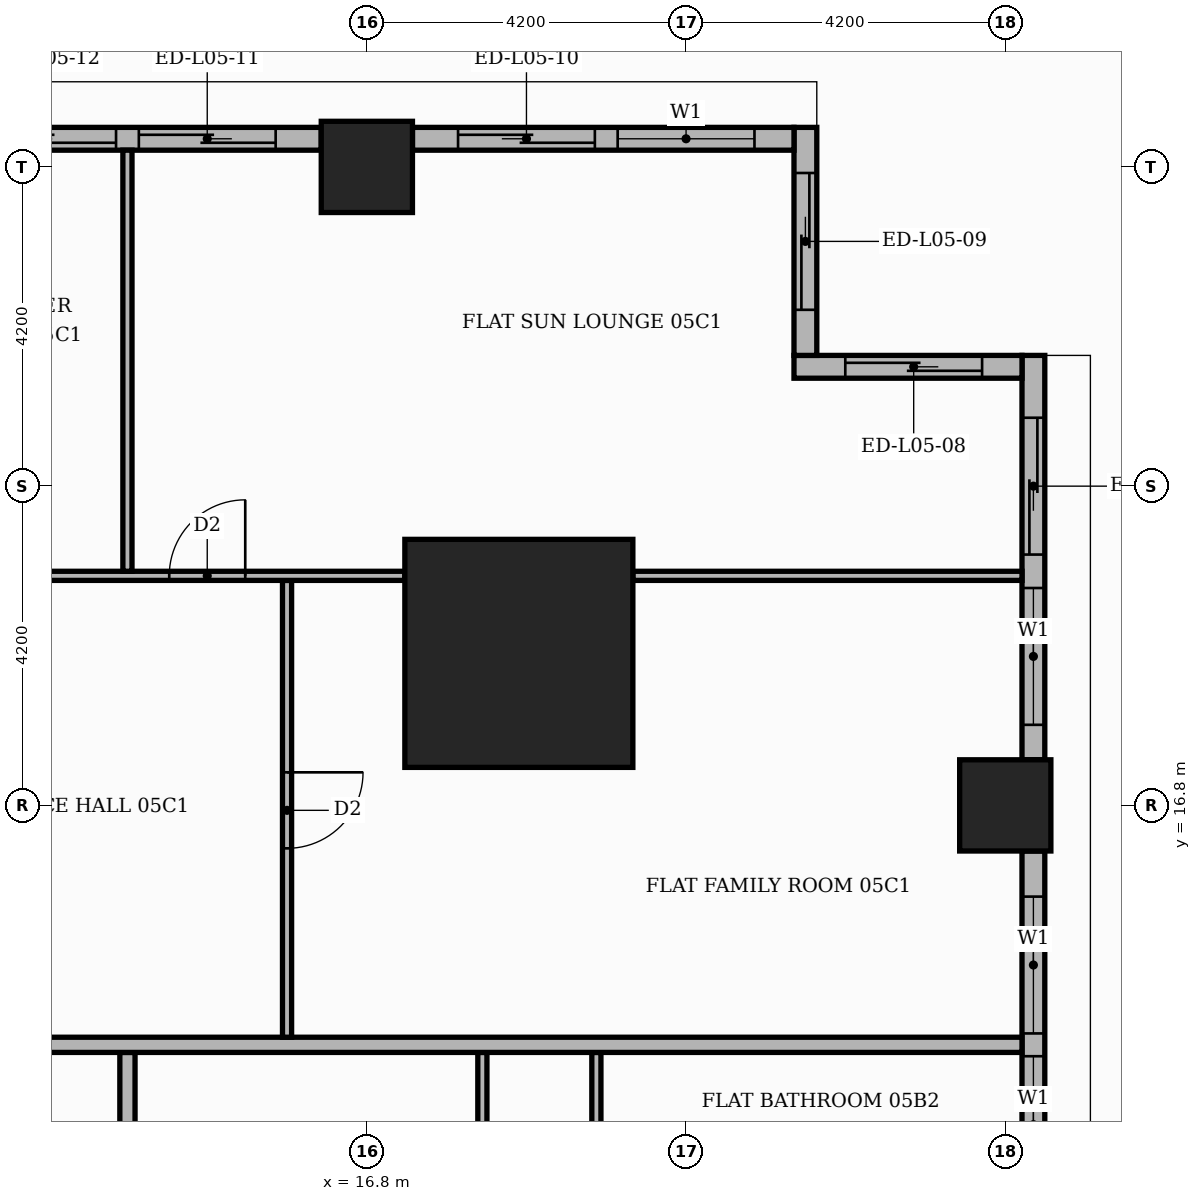
"""IFC4 building model, lengths in metres.
Left out: names, types, materials, properties, quantities, classifications, styles, units other than length and angle.
Written with IfcOpenShell. Run it as: python <this file> out.ifc"""

import sys

from ifc_helpers import new_model, si_unit, direction, frame, frame_2d, origin, origin_2d, place, context, subcontext, project, spatial, rectangle, extrude, element, fill, save


model = new_model("IFC4")
c1 = context("Model", 3, precision=1e-05, world=origin(), true_north=direction((0.0, 1.0)))
c2 = subcontext(c1, "Body", "Model", "MODEL_VIEW")
j1 = project(units=[si_unit("LENGTHUNIT", "METRE"), si_unit("PLANEANGLEUNIT", "RADIAN")], contexts=[c1])
p1 = place(None, origin())
s1 = spatial("IfcSite", under=j1, at=p1, CompositionType="ELEMENT")
p2 = place(p1, origin())
s2 = spatial("IfcBuilding", under=s1, at=p2, CompositionType="ELEMENT")
p3 = place(p2, frame((0.0, 0.0, 27.0)))
s3 = spatial("IfcBuildingStorey", under=s2, at=p3, CompositionType="ELEMENT", Elevation=27.0)
p4 = place(p3, frame((18.8, 18.8, 0.0), z_axis=(0.0, 0.0, 1.0), x_axis=(1.0, 0.0, 0.0)))
e1 = element("IfcColumn", 1, at=p4, inside=s3, PredefinedType="COLUMN", context=c2, shape_type="SweptSolid", body=[
    extrude(rectangle(XDim=3.0, YDim=3.0, at=origin_2d()), origin(), (0.0, 0.0, 1.0), 3.9),
])
for number, where, z_axis, x_axis in (
    (2, (25.2, 16.8, 0.0), (0.0, 0.0, 1.0), (1.0, 0.0, 0.0)),
    (3, (16.8, 25.2, 0.0), (0.0, 0.0, 1.0), (1.0, 0.0, 0.0)),
):
    element("IfcColumn", number, at=place(p3, frame(where, z_axis=z_axis, x_axis=x_axis)), inside=s3, PredefinedType="COLUMN", context=c2, shape_type="SweptSolid", body=[
        extrude(rectangle(XDim=1.2, YDim=1.2, at=origin_2d()), origin(), (0.0, 0.0, 1.0), 3.9),
    ])
p5 = place(p3, frame((25.57, 9.0, 0.0), z_axis=(0.0, 0.0, 1.0), x_axis=(0.0, 1.0, 0.0)))
e4 = element("IfcWall", 4, at=p5, inside=s3, PredefinedType="STANDARD", context=c2, shape_type="SweptSolid", body=[
    extrude(rectangle(XDim=7.2, YDim=0.3, at=frame_2d((3.6, 0.0))), origin(), (0.0, 0.0, 1.0), 3.48),
])
p6 = place(p5, frame((0.6, 0.0, 0.9)))
e5 = element("IfcOpeningElement", 5, at=p6, cuts=e4, PredefinedType="OPENING", context=c2, shape_type="SweptSolid", body=[
    extrude(rectangle(XDim=1.8, YDim=2.1, at=frame_2d((0.9, 1.05))), frame((0.0, 0.16, 0.0), z_axis=(0.0, -1.0, 0.0), x_axis=(1.0, 0.0, 0.0)), (0.0, 0.0, 1.0), 0.32),
])
p7 = place(p5, frame((2.7, 0.0, 0.9)))
e6 = element("IfcOpeningElement", 6, at=p7, cuts=e4, PredefinedType="OPENING", context=c2, shape_type="SweptSolid", body=[
    extrude(rectangle(XDim=1.8, YDim=2.1, at=frame_2d((0.9, 1.05))), frame((0.0, 0.16, 0.0), z_axis=(0.0, -1.0, 0.0), x_axis=(1.0, 0.0, 0.0)), (0.0, 0.0, 1.0), 0.32),
])
p8 = place(p5, frame((4.8, 0.0, 0.9)))
e7 = element("IfcOpeningElement", 7, at=p8, cuts=e4, PredefinedType="OPENING", context=c2, shape_type="SweptSolid", body=[
    extrude(rectangle(XDim=1.8, YDim=2.1, at=frame_2d((0.9, 1.05))), frame((0.0, 0.16, 0.0), z_axis=(0.0, -1.0, 0.0), x_axis=(1.0, 0.0, 0.0)), (0.0, 0.0, 1.0), 0.32),
])
p9 = place(p3, frame((25.57, 17.4, 0.0), z_axis=(0.0, 0.0, 1.0), x_axis=(0.0, 1.0, 0.0)))
e8 = element("IfcWall", 8, at=p9, inside=s3, PredefinedType="STANDARD", context=c2, shape_type="SweptSolid", body=[
    extrude(rectangle(XDim=5.32, YDim=0.3, at=frame_2d((2.66, 0.0))), origin(), (0.0, 0.0, 1.0), 3.48),
])
p10 = place(p9, frame((2.7, 0.0, 0.0)))
e9 = element("IfcOpeningElement", 9, at=p10, cuts=e8, PredefinedType="OPENING", context=c2, shape_type="SweptSolid", body=[
    extrude(rectangle(XDim=1.8, YDim=2.4, at=frame_2d((0.9, 1.2))), frame((0.0, 0.16, 0.0), z_axis=(0.0, -1.0, 0.0), x_axis=(1.0, 0.0, 0.0)), (0.0, 0.0, 1.0), 0.32),
])
p11 = place(p9, frame((0.46, 0.0, 0.9)))
e10 = element("IfcOpeningElement", 10, at=p11, cuts=e8, PredefinedType="OPENING", context=c2, shape_type="SweptSolid", body=[
    extrude(rectangle(XDim=1.8, YDim=2.1, at=frame_2d((0.9, 1.05))), frame((0.0, 0.16, 0.0), z_axis=(0.0, -1.0, 0.0), x_axis=(1.0, 0.0, 0.0)), (0.0, 0.0, 1.0), 0.32),
])
p12 = place(p3, frame((25.42, 22.57, 0.0), z_axis=(0.0, 0.0, 1.0), x_axis=(-1.0, 0.0, 0.0)))
e11 = element("IfcWall", 11, at=p12, inside=s3, PredefinedType="STANDARD", context=c2, shape_type="SweptSolid", body=[
    extrude(rectangle(XDim=3.0, YDim=0.3, at=frame_2d((1.5, 0.0))), origin(), (0.0, 0.0, 1.0), 3.48),
])
p13 = place(p12, frame((0.525, 0.0, 0.0)))
e12 = element("IfcOpeningElement", 12, at=p13, cuts=e11, PredefinedType="OPENING", context=c2, shape_type="SweptSolid", body=[
    extrude(rectangle(XDim=1.8, YDim=2.4, at=frame_2d((0.9, 1.2))), frame((0.0, 0.16, 0.0), z_axis=(0.0, -1.0, 0.0), x_axis=(1.0, 0.0, 0.0)), (0.0, 0.0, 1.0), 0.32),
])
p14 = place(p3, frame((22.57, 22.72, 0.0), z_axis=(0.0, 0.0, 1.0), x_axis=(0.0, 1.0, 0.0)))
e13 = element("IfcWall", 13, at=p14, inside=s3, PredefinedType="STANDARD", context=c2, shape_type="SweptSolid", body=[
    extrude(rectangle(XDim=3.0, YDim=0.3, at=frame_2d((1.5, 0.0))), origin(), (0.0, 0.0, 1.0), 3.48),
])
p15 = place(p14, frame((0.6, 0.0, 0.0)))
e14 = element("IfcOpeningElement", 14, at=p15, cuts=e13, PredefinedType="OPENING", context=c2, shape_type="SweptSolid", body=[
    extrude(rectangle(XDim=1.8, YDim=2.4, at=frame_2d((0.9, 1.2))), frame((0.0, 0.16, 0.0), z_axis=(0.0, -1.0, 0.0), x_axis=(1.0, 0.0, 0.0)), (0.0, 0.0, 1.0), 0.32),
])
p16 = place(p3, frame((22.42, 25.57, 0.0), z_axis=(0.0, 0.0, 1.0), x_axis=(-1.0, 0.0, 0.0)))
e15 = element("IfcWall", 15, at=p16, inside=s3, PredefinedType="STANDARD", context=c2, shape_type="SweptSolid", body=[
    extrude(rectangle(XDim=5.02, YDim=0.3, at=frame_2d((2.51, 0.0))), origin(), (0.0, 0.0, 1.0), 3.48),
])
p17 = place(p16, frame((0.52, 0.0, 0.9)))
e16 = element("IfcOpeningElement", 16, at=p17, cuts=e15, PredefinedType="OPENING", context=c2, shape_type="SweptSolid", body=[
    extrude(rectangle(XDim=1.8, YDim=2.1, at=frame_2d((0.9, 1.05))), frame((0.0, 0.16, 0.0), z_axis=(0.0, -1.0, 0.0), x_axis=(1.0, 0.0, 0.0)), (0.0, 0.0, 1.0), 0.32),
])
p18 = place(p16, frame((2.62, 0.0, 0.0)))
e17 = element("IfcOpeningElement", 17, at=p18, cuts=e15, PredefinedType="OPENING", context=c2, shape_type="SweptSolid", body=[
    extrude(rectangle(XDim=1.8, YDim=2.4, at=frame_2d((0.9, 1.2))), frame((0.0, 0.16, 0.0), z_axis=(0.0, -1.0, 0.0), x_axis=(1.0, 0.0, 0.0)), (0.0, 0.0, 1.0), 0.32),
])
p19 = place(p3, frame((16.2, 25.57, 0.0), z_axis=(0.0, 0.0, 1.0), x_axis=(-1.0, 0.0, 0.0)))
e18 = element("IfcWall", 18, at=p19, inside=s3, PredefinedType="STANDARD", context=c2, shape_type="SweptSolid", body=[
    extrude(rectangle(XDim=7.2, YDim=0.3, at=frame_2d((3.6, 0.0))), origin(), (0.0, 0.0, 1.0), 3.48),
])
p20 = place(p19, frame((0.6, 0.0, 0.0)))
e19 = element("IfcOpeningElement", 19, at=p20, cuts=e18, PredefinedType="OPENING", context=c2, shape_type="SweptSolid", body=[
    extrude(rectangle(XDim=1.8, YDim=2.4, at=frame_2d((0.9, 1.2))), frame((0.0, 0.16, 0.0), z_axis=(0.0, -1.0, 0.0), x_axis=(1.0, 0.0, 0.0)), (0.0, 0.0, 1.0), 0.32),
])
p21 = place(p19, frame((2.7, 0.0, 0.0)))
e20 = element("IfcOpeningElement", 20, at=p21, cuts=e18, PredefinedType="OPENING", context=c2, shape_type="SweptSolid", body=[
    extrude(rectangle(XDim=1.8, YDim=2.4, at=frame_2d((0.9, 1.2))), frame((0.0, 0.16, 0.0), z_axis=(0.0, -1.0, 0.0), x_axis=(1.0, 0.0, 0.0)), (0.0, 0.0, 1.0), 0.32),
])
p22 = place(p19, frame((4.8, 0.0, 0.9)))
e21 = element("IfcOpeningElement", 21, at=p22, cuts=e18, PredefinedType="OPENING", context=c2, shape_type="SweptSolid", body=[
    extrude(rectangle(XDim=1.8, YDim=2.1, at=frame_2d((0.9, 1.05))), frame((0.0, 0.16, 0.0), z_axis=(0.0, -1.0, 0.0), x_axis=(1.0, 0.0, 0.0)), (0.0, 0.0, 1.0), 0.32),
])
p23 = place(p3, frame((13.65, -5.15, 0.0), z_axis=(0.0, 0.0, 1.0), x_axis=(0.0, 1.0, 0.0)))
e22 = element("IfcWall", 22, at=p23, inside=s3, PredefinedType="PARTITIONING", context=c2, shape_type="SweptSolid", body=[
    extrude(rectangle(XDim=18.7, YDim=0.2, at=frame_2d((9.35, 0.0))), origin(), (0.0, 0.0, 1.0), 3.48),
])
p24 = place(p23, frame((3.55, 0.0, 0.0)))
e23 = element("IfcOpeningElement", 23, at=p24, cuts=e22, PredefinedType="OPENING", context=c2, shape_type="SweptSolid", body=[
    extrude(rectangle(XDim=1.1, YDim=2.4, at=frame_2d((0.55, 1.2))), frame((0.0, 0.11, 0.0), z_axis=(0.0, -1.0, 0.0), x_axis=(1.0, 0.0, 0.0)), (0.0, 0.0, 1.0), 0.22),
])
p25 = place(p3, frame((18.32, 9.81, 0.0), z_axis=(0.0, 0.0, 1.0), x_axis=(0.0, 1.0, 0.0)))
e24 = element("IfcWall", 24, at=p25, inside=s3, PredefinedType="PARTITIONING", context=c2, shape_type="SweptSolid", body=[
    extrude(rectangle(XDim=3.74, YDim=0.12, at=frame_2d((1.87, 0.0))), origin(), (0.0, 0.0, 1.0), 3.48),
])
p26 = place(p25, frame((1.44, 0.0, 0.0)))
e25 = element("IfcOpeningElement", 25, at=p26, cuts=e24, PredefinedType="OPENING", context=c2, shape_type="SweptSolid", body=[
    extrude(rectangle(XDim=0.9, YDim=2.1, at=frame_2d((0.45, 1.05))), frame((0.0, 0.07, 0.0), z_axis=(0.0, -1.0, 0.0), x_axis=(1.0, 0.0, 0.0)), (0.0, 0.0, 1.0), 0.14),
])
p27 = place(p3, frame((19.82, 11.61, 0.0), z_axis=(0.0, 0.0, 1.0), x_axis=(0.0, 1.0, 0.0)))
e26 = element("IfcWall", 26, at=p27, inside=s3, PredefinedType="PARTITIONING", context=c2, shape_type="SweptSolid", body=[
    extrude(rectangle(XDim=1.94, YDim=0.12, at=frame_2d((0.97, 0.0))), origin(), (0.0, 0.0, 1.0), 3.48),
])
p28 = place(p3, frame((-13.65, 13.65, 0.0), z_axis=(0.0, 0.0, 1.0), x_axis=(1.0, 0.0, 0.0)))
e27 = element("IfcWall", 27, at=p28, inside=s3, PredefinedType="PARTITIONING", context=c2, shape_type="SweptSolid", body=[
    extrude(rectangle(XDim=39.07, YDim=0.2, at=frame_2d((19.535, 0.0))), origin(), (0.0, 0.0, 1.0), 3.48),
])
p29 = place(p28, frame((24.65, 0.0, 0.0)))
e28 = element("IfcOpeningElement", 28, at=p29, cuts=e27, PredefinedType="OPENING", context=c2, shape_type="SweptSolid", body=[
    extrude(rectangle(XDim=1.1, YDim=2.4, at=frame_2d((0.55, 1.2))), frame((0.0, 0.11, 0.0), z_axis=(0.0, -1.0, 0.0), x_axis=(1.0, 0.0, 0.0)), (0.0, 0.0, 1.0), 0.22),
])
p30 = place(p28, frame((14.15, 0.0, 0.0)))
e29 = element("IfcOpeningElement", 29, at=p30, cuts=e27, PredefinedType="OPENING", context=c2, shape_type="SweptSolid", body=[
    extrude(rectangle(XDim=1.1, YDim=2.4, at=frame_2d((0.55, 1.2))), frame((0.0, 0.11, 0.0), z_axis=(0.0, -1.0, 0.0), x_axis=(1.0, 0.0, 0.0)), (0.0, 0.0, 1.0), 0.22),
])
p31 = place(p3, frame((15.75, 13.75, 0.0), z_axis=(0.0, 0.0, 1.0), x_axis=(0.0, 1.0, 0.0)))
e30 = element("IfcWall", 30, at=p31, inside=s3, PredefinedType="PARTITIONING", context=c2, shape_type="SweptSolid", body=[
    extrude(rectangle(XDim=6.01, YDim=0.12, at=frame_2d((3.005, 0.0))), origin(), (0.0, 0.0, 1.0), 3.48),
])
p32 = place(p31, frame((2.485, 0.0, 0.0)))
e31 = element("IfcOpeningElement", 31, at=p32, cuts=e30, PredefinedType="OPENING", context=c2, shape_type="SweptSolid", body=[
    extrude(rectangle(XDim=1.0, YDim=2.1, at=frame_2d((0.5, 1.05))), frame((0.0, 0.07, 0.0), z_axis=(0.0, -1.0, 0.0), x_axis=(1.0, 0.0, 0.0)), (0.0, 0.0, 1.0), 0.14),
])
p33 = place(p3, frame((5.35, 19.82, 0.0), z_axis=(0.0, 0.0, 1.0), x_axis=(1.0, 0.0, 0.0)))
e32 = element("IfcWall", 32, at=p33, inside=s3, PredefinedType="PARTITIONING", context=c2, shape_type="SweptSolid", body=[
    extrude(rectangle(XDim=11.95, YDim=0.12, at=frame_2d((5.975, 0.0))), origin(), (0.0, 0.0, 1.0), 3.48),
])
p34 = place(p33, frame((8.85, 0.0, 0.0)))
e33 = element("IfcOpeningElement", 33, at=p34, cuts=e32, PredefinedType="OPENING", context=c2, shape_type="SweptSolid", body=[
    extrude(rectangle(XDim=1.0, YDim=2.1, at=frame_2d((0.5, 1.05))), frame((0.0, 0.07, 0.0), z_axis=(0.0, -1.0, 0.0), x_axis=(1.0, 0.0, 0.0)), (0.0, 0.0, 1.0), 0.14),
])
p35 = place(p33, frame((5.75, 0.0, 0.0)))
e34 = element("IfcOpeningElement", 34, at=p35, cuts=e32, PredefinedType="OPENING", context=c2, shape_type="SweptSolid", body=[
    extrude(rectangle(XDim=0.9, YDim=2.1, at=frame_2d((0.45, 1.05))), frame((0.0, 0.07, 0.0), z_axis=(0.0, -1.0, 0.0), x_axis=(1.0, 0.0, 0.0)), (0.0, 0.0, 1.0), 0.14),
])
p36 = place(p3, frame((20.3, 19.82, 0.0), z_axis=(0.0, 0.0, 1.0), x_axis=(1.0, 0.0, 0.0)))
e35 = element("IfcWall", 35, at=p36, inside=s3, PredefinedType="PARTITIONING", context=c2, shape_type="SweptSolid", body=[
    extrude(rectangle(XDim=5.12, YDim=0.12, at=frame_2d((2.56, 0.0))), origin(), (0.0, 0.0, 1.0), 3.48),
])
p37 = place(p3, frame((13.65, 19.88, 0.0), z_axis=(0.0, 0.0, 1.0), x_axis=(0.0, 1.0, 0.0)))
e36 = element("IfcWall", 36, at=p37, inside=s3, PredefinedType="PARTITIONING", context=c2, shape_type="SweptSolid", body=[
    extrude(rectangle(XDim=5.54, YDim=0.12, at=frame_2d((2.77, 0.0))), origin(), (0.0, 0.0, 1.0), 3.48),
])
p38 = place(p7, origin())
e37 = element("IfcWindow", 37, at=p38, inside=s3, PartitioningType="SINGLE_PANEL", PredefinedType="WINDOW", context=c2, shape_type="SweptSolid", body=[
    extrude(rectangle(XDim=1.8, YDim=2.1, at=frame_2d((0.9, 1.05))), frame((0.0, 0.03, 0.0), z_axis=(0.0, -1.0, 0.0), x_axis=(1.0, 0.0, 0.0)), (0.0, 0.0, 1.0), 0.06),
])
fill(e6, e37)
p39 = place(p8, origin())
e38 = element("IfcWindow", 38, at=p39, inside=s3, PartitioningType="SINGLE_PANEL", PredefinedType="WINDOW", context=c2, shape_type="SweptSolid", body=[
    extrude(rectangle(XDim=1.8, YDim=2.1, at=frame_2d((0.9, 1.05))), frame((0.0, 0.03, 0.0), z_axis=(0.0, -1.0, 0.0), x_axis=(1.0, 0.0, 0.0)), (0.0, 0.0, 1.0), 0.06),
])
fill(e7, e38)
p40 = place(p10, origin())
e39 = element("IfcDoor", 39, at=p40, inside=s3, OperationType="SLIDING_TO_LEFT", PredefinedType="DOOR", context=c2, shape_type="SweptSolid", body=[
    extrude(rectangle(XDim=1.8, YDim=2.4, at=frame_2d((0.9, 1.2))), frame((0.0, 0.025, 0.0), z_axis=(0.0, -1.0, 0.0), x_axis=(1.0, 0.0, 0.0)), (0.0, 0.0, 1.0), 0.05),
])
fill(e9, e39)
p41 = place(p11, origin())
e40 = element("IfcWindow", 40, at=p41, inside=s3, PartitioningType="SINGLE_PANEL", PredefinedType="WINDOW", context=c2, shape_type="SweptSolid", body=[
    extrude(rectangle(XDim=1.8, YDim=2.1, at=frame_2d((0.9, 1.05))), frame((0.0, 0.03, 0.0), z_axis=(0.0, -1.0, 0.0), x_axis=(1.0, 0.0, 0.0)), (0.0, 0.0, 1.0), 0.06),
])
fill(e10, e40)
p42 = place(p13, origin())
e41 = element("IfcDoor", 41, at=p42, inside=s3, OperationType="SLIDING_TO_LEFT", PredefinedType="DOOR", context=c2, shape_type="SweptSolid", body=[
    extrude(rectangle(XDim=1.8, YDim=2.4, at=frame_2d((0.9, 1.2))), frame((0.0, 0.025, 0.0), z_axis=(0.0, -1.0, 0.0), x_axis=(1.0, 0.0, 0.0)), (0.0, 0.0, 1.0), 0.05),
])
fill(e12, e41)
p43 = place(p15, origin())
e42 = element("IfcDoor", 42, at=p43, inside=s3, OperationType="SLIDING_TO_RIGHT", PredefinedType="DOOR", context=c2, shape_type="SweptSolid", body=[
    extrude(rectangle(XDim=1.8, YDim=2.4, at=frame_2d((0.9, 1.2))), frame((0.0, 0.025, 0.0), z_axis=(0.0, -1.0, 0.0), x_axis=(1.0, 0.0, 0.0)), (0.0, 0.0, 1.0), 0.05),
])
fill(e14, e42)
p44 = place(p17, origin())
e43 = element("IfcWindow", 43, at=p44, inside=s3, PartitioningType="SINGLE_PANEL", PredefinedType="WINDOW", context=c2, shape_type="SweptSolid", body=[
    extrude(rectangle(XDim=1.8, YDim=2.1, at=frame_2d((0.9, 1.05))), frame((0.0, 0.03, 0.0), z_axis=(0.0, -1.0, 0.0), x_axis=(1.0, 0.0, 0.0)), (0.0, 0.0, 1.0), 0.06),
])
fill(e16, e43)
p45 = place(p18, origin())
e44 = element("IfcDoor", 44, at=p45, inside=s3, OperationType="SLIDING_TO_RIGHT", PredefinedType="DOOR", context=c2, shape_type="SweptSolid", body=[
    extrude(rectangle(XDim=1.8, YDim=2.4, at=frame_2d((0.9, 1.2))), frame((0.0, 0.025, 0.0), z_axis=(0.0, -1.0, 0.0), x_axis=(1.0, 0.0, 0.0)), (0.0, 0.0, 1.0), 0.05),
])
fill(e17, e44)
p46 = place(p20, origin())
e45 = element("IfcDoor", 45, at=p46, inside=s3, OperationType="SLIDING_TO_LEFT", PredefinedType="DOOR", context=c2, shape_type="SweptSolid", body=[
    extrude(rectangle(XDim=1.8, YDim=2.4, at=frame_2d((0.9, 1.2))), frame((0.0, 0.025, 0.0), z_axis=(0.0, -1.0, 0.0), x_axis=(1.0, 0.0, 0.0)), (0.0, 0.0, 1.0), 0.05),
])
fill(e19, e45)
p47 = place(p21, origin())
e46 = element("IfcDoor", 46, at=p47, inside=s3, OperationType="SLIDING_TO_RIGHT", PredefinedType="DOOR", context=c2, shape_type="SweptSolid", body=[
    extrude(rectangle(XDim=1.8, YDim=2.4, at=frame_2d((0.9, 1.2))), frame((0.0, 0.025, 0.0), z_axis=(0.0, -1.0, 0.0), x_axis=(1.0, 0.0, 0.0)), (0.0, 0.0, 1.0), 0.05),
])
fill(e20, e46)
p48 = place(p32, frame((1.0, 0.0, 0.0), z_axis=(0.0, 0.0, 1.0), x_axis=(-1.0, 0.0, 0.0)))
e47 = element("IfcDoor", 47, at=p48, inside=s3, OperationType="SINGLE_SWING_RIGHT", PredefinedType="DOOR", context=c2, shape_type="SweptSolid", body=[
    extrude(rectangle(XDim=1.0, YDim=2.1, at=frame_2d((0.5, 1.05))), frame((0.0, 0.025, 0.0), z_axis=(0.0, -1.0, 0.0), x_axis=(1.0, 0.0, 0.0)), (0.0, 0.0, 1.0), 0.05),
])
fill(e31, e47)
p49 = place(p34, origin())
e48 = element("IfcDoor", 48, at=p49, inside=s3, OperationType="SINGLE_SWING_RIGHT", PredefinedType="DOOR", context=c2, shape_type="SweptSolid", body=[
    extrude(rectangle(XDim=1.0, YDim=2.1, at=frame_2d((0.5, 1.05))), frame((0.0, 0.025, 0.0), z_axis=(0.0, -1.0, 0.0), x_axis=(1.0, 0.0, 0.0)), (0.0, 0.0, 1.0), 0.05),
])
fill(e33, e48)
save(model, sys.argv[1])
